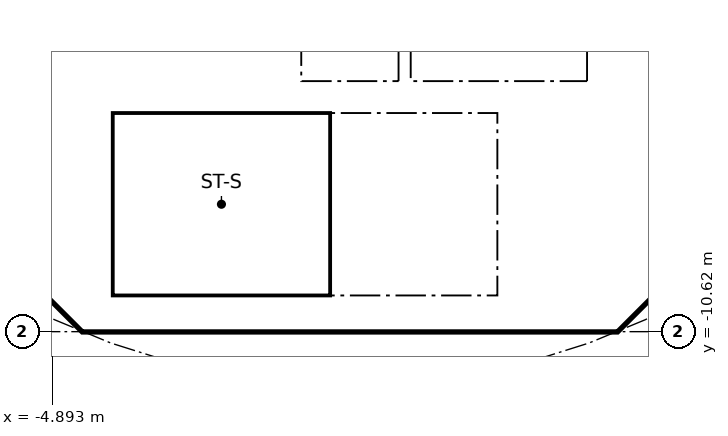
"""IFC4 building model, lengths in metres.
Left out: names, types, materials, properties, quantities, classifications, styles, units other than length and angle.
Written with IfcOpenShell. Run it as: python <this file> out.ifc"""

import sys

from ifc_helpers import new_model, si_unit, direction, frame, frame_2d, origin, place, context, subcontext, project, spatial, polyline, rectangle, outline, extrude, element, fill, save


model = new_model("IFC4")
c1 = context("Model", 3, precision=1e-05, world=origin(), true_north=direction((0.0, 1.0)))
c2 = subcontext(c1, "Body", "Model", "MODEL_VIEW")
j1 = project(units=[si_unit("LENGTHUNIT", "METRE"), si_unit("PLANEANGLEUNIT", "RADIAN")], contexts=[c1])
p1 = place(None, origin())
s1 = spatial("IfcSite", under=j1, at=p1, CompositionType="ELEMENT")
p2 = place(p1, origin())
s2 = spatial("IfcBuilding", under=s1, at=p2, CompositionType="ELEMENT")
p3 = place(p2, frame((0.0, 0.0, 184.4)))
s3 = spatial("IfcBuildingStorey", under=s2, at=p3, CompositionType="ELEMENT", Elevation=184.4)
p4 = place(p3, frame((-9.988, -4.613, 0.0), z_axis=(0.0, 0.0, 1.0), x_axis=(0.707106781187, -0.707106781187, 0.0)))
e1 = element("IfcWall", 1, at=p4, inside=s3, PredefinedType="SHEAR", context=c2, shape_type="SweptSolid", body=[
    extrude(rectangle(XDim=7.602, YDim=0.6, at=frame_2d((3.801, 0.0))), origin(), (0.0, 0.0, 1.0), 3.44),
])
p5 = place(p4, frame((6.151, 0.0, 0.0)))
e2 = element("IfcOpeningElement", 2, at=p5, cuts=e1, PredefinedType="OPENING", context=c2, shape_type="SweptSolid", body=[
    extrude(rectangle(XDim=1.1, YDim=2.1, at=frame_2d((0.55, 1.05))), frame((0.0, 0.31, 0.0), z_axis=(0.0, -1.0, 0.0), x_axis=(1.0, 0.0, 0.0)), (0.0, 0.0, 1.0), 0.62),
])
p6 = place(p3, frame((4.613, -9.988, 0.0), z_axis=(0.0, 0.0, 1.0), x_axis=(0.707106781187, 0.707106781187, 0.0)))
e3 = element("IfcWall", 3, at=p6, inside=s3, PredefinedType="SHEAR", context=c2, shape_type="SweptSolid", body=[
    extrude(rectangle(XDim=7.602, YDim=0.6, at=frame_2d((3.801, 0.0))), origin(), (0.0, 0.0, 1.0), 3.44),
])
p7 = place(p6, frame((3.201, 0.0, 0.0)))
e4 = element("IfcOpeningElement", 4, at=p7, cuts=e3, PredefinedType="OPENING", context=c2, shape_type="SweptSolid", body=[
    extrude(rectangle(XDim=1.2, YDim=2.1, at=frame_2d((0.6, 1.05))), frame((0.0, 0.31, 0.0), z_axis=(0.0, -1.0, 0.0), x_axis=(1.0, 0.0, 0.0)), (0.0, 0.0, 1.0), 0.62),
])
p8 = place(p3, frame((4.0, -10.025, 0.0), z_axis=(0.0, 0.0, 1.0), x_axis=(0.0, 1.0, 0.0)))
e5 = element("IfcWall", 5, at=p8, inside=s3, PredefinedType="SOLIDWALL", context=c2, shape_type="SweptSolid", body=[
    extrude(rectangle(XDim=3.0, YDim=0.2, at=frame_2d((1.5, 0.0))), origin(), (0.0, 0.0, 1.0), 3.44),
])
p9 = place(p8, frame((0.975, 0.0, 0.0)))
e6 = element("IfcOpeningElement", 6, at=p9, cuts=e5, PredefinedType="OPENING", context=c2, shape_type="SweptSolid", body=[
    extrude(rectangle(XDim=1.1, YDim=2.1, at=frame_2d((0.55, 1.05))), frame((0.0, 0.11, 0.0), z_axis=(0.0, -1.0, 0.0), x_axis=(1.0, 0.0, 0.0)), (0.0, 0.0, 1.0), 0.22),
])
p10 = place(p3, frame((4.0, -6.5, 0.0), z_axis=(0.0, 0.0, 1.0), x_axis=(0.0, 1.0, 0.0)))
e7 = element("IfcWall", 7, at=p10, inside=s3, PredefinedType="SOLIDWALL", context=c2, shape_type="SweptSolid", body=[
    extrude(rectangle(XDim=2.2, YDim=0.2, at=frame_2d((1.1, 0.0))), origin(), (0.0, 0.0, 1.0), 3.44),
])
p11 = place(p10, frame((0.55, 0.0, 0.0)))
e8 = element("IfcOpeningElement", 8, at=p11, cuts=e7, PredefinedType="OPENING", context=c2, shape_type="SweptSolid", body=[
    extrude(rectangle(XDim=1.1, YDim=2.1, at=frame_2d((0.55, 1.05))), frame((0.0, 0.11, 0.0), z_axis=(0.0, -1.0, 0.0), x_axis=(1.0, 0.0, 0.0)), (0.0, 0.0, 1.0), 0.22),
])
p12 = place(p3, frame((-4.0, -6.5, 0.0), z_axis=(0.0, 0.0, 1.0), x_axis=(0.0, 1.0, 0.0)))
e9 = element("IfcWall", 9, at=p12, inside=s3, PredefinedType="SOLIDWALL", context=c2, shape_type="SweptSolid", body=[
    extrude(rectangle(XDim=2.2, YDim=0.2, at=frame_2d((1.1, 0.0))), origin(), (0.0, 0.0, 1.0), 3.44),
])
p13 = place(p12, frame((0.65, 0.0, 0.0)))
e10 = element("IfcOpeningElement", 10, at=p13, cuts=e9, PredefinedType="OPENING", context=c2, shape_type="SweptSolid", body=[
    extrude(rectangle(XDim=0.9, YDim=2.1, at=frame_2d((0.45, 1.05))), frame((0.0, 0.11, 0.0), z_axis=(0.0, -1.0, 0.0), x_axis=(1.0, 0.0, 0.0)), (0.0, 0.0, 1.0), 0.22),
])
p14 = place(p3, origin())
e11 = element("IfcWall", 11, at=p14, inside=s3, PredefinedType="SHEAR", context=c2, shape_type="SweptSolid", body=[
    extrude(outline(polyline([(-4.152, -10.025), (4.152, -10.025), (4.401, -9.776), (4.825, -10.2), (4.401, -10.625), (-4.401, -10.625), (-4.825, -10.2), (-4.401, -9.776), (-4.152, -10.025)])), origin(), (0.0, 0.0, 1.0), 3.44),
])
for number, where, z_axis, x_axis in (
    (12, (-0.9, -6.5, 0.0), (0.0, 0.0, 1.0), (0.0, 1.0, 0.0)),
    (13, (0.9, -6.5, 0.0), (0.0, 0.0, 1.0), (0.0, 1.0, 0.0)),
):
    element("IfcWall", number, at=place(p3, frame(where, z_axis=z_axis, x_axis=x_axis)), inside=s3, PredefinedType="SOLIDWALL", context=c2, shape_type="SweptSolid", body=[
        extrude(rectangle(XDim=2.2, YDim=0.2, at=frame_2d((1.1, 0.0))), origin(), (0.0, 0.0, 1.0), 3.44),
    ])
p15 = place(p3, origin())
e14 = element("IfcWall", 14, at=p15, inside=s3, PredefinedType="SOLIDWALL", context=c2, shape_type="SweptSolid", body=[
    extrude(outline(polyline([(-3.9, -10.025), (-4.1, -10.025), (-4.1, -7.025), (-3.9, -7.025), (-3.9, -10.025)])), origin(), (0.0, 0.0, 1.0), 3.44),
])
p16 = place(p3, origin())
e15 = element("IfcWall", 15, at=p16, inside=s3, PredefinedType="SOLIDWALL", context=c2, shape_type="SweptSolid", body=[
    extrude(outline(polyline([(4.1, -7.025), (-4.1, -7.025), (-4.1, -6.5), (4.1, -6.5), (4.1, -7.025)])), origin(), (0.0, 0.0, 1.0), 3.44),
])
p17 = place(p9, origin())
e16 = element("IfcDoor", 16, at=p17, inside=s3, OperationType="SINGLE_SWING_RIGHT", PredefinedType="DOOR", context=c2, shape_type="SweptSolid", body=[
    extrude(rectangle(XDim=1.1, YDim=2.1, at=frame_2d((0.55, 1.05))), frame((0.0, 0.025, 0.0), z_axis=(0.0, -1.0, 0.0), x_axis=(1.0, 0.0, 0.0)), (0.0, 0.0, 1.0), 0.05),
])
fill(e6, e16)
p18 = place(p5, origin())
e17 = element("IfcDoor", 17, at=p18, inside=s3, OperationType="SINGLE_SWING_RIGHT", PredefinedType="DOOR", context=c2, shape_type="SweptSolid", body=[
    extrude(rectangle(XDim=1.1, YDim=2.1, at=frame_2d((0.55, 1.05))), frame((0.0, 0.025, 0.0), z_axis=(0.0, -1.0, 0.0), x_axis=(1.0, 0.0, 0.0)), (0.0, 0.0, 1.0), 0.05),
])
fill(e2, e17)
save(model, sys.argv[1])
